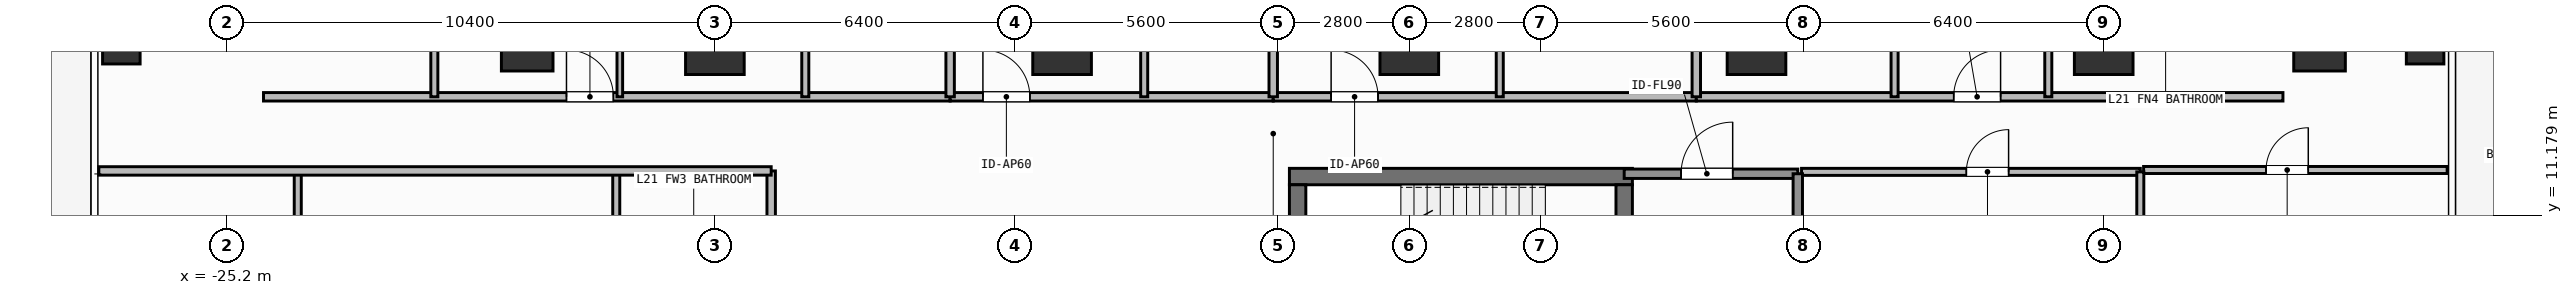
"""IFC4 building model, lengths in metres.
Left out: names, types, materials, properties, quantities, classifications, styles, units other than length and angle.
Written with IfcOpenShell. Run it as: python <this file> out.ifc"""

import sys

from ifc_helpers import new_model, si_unit, direction, frame, frame_2d, origin, origin_2d, place, context, subcontext, project, spatial, rectangle, hollow_rectangle, extrude, element, fill, save


model = new_model("IFC4")
c1 = context("Model", 3, precision=1e-05, world=origin(), true_north=direction((0.0, 1.0)))
c2 = subcontext(c1, "Body", "Model", "MODEL_VIEW")
j1 = project(units=[si_unit("LENGTHUNIT", "METRE"), si_unit("PLANEANGLEUNIT", "RADIAN")], contexts=[c1])
p1 = place(None, origin())
s1 = spatial("IfcSite", under=j1, at=p1, CompositionType="ELEMENT")
p2 = place(p1, origin())
s2 = spatial("IfcBuilding", under=s1, at=p2, CompositionType="ELEMENT")
p3 = place(p2, frame((0.0, 0.0, 85.2)))
s3 = spatial("IfcBuildingStorey", under=s2, at=p3, CompositionType="ELEMENT", Elevation=85.2)
p4 = place(p3, frame((-2.555, 12.0, 0.0), z_axis=(0.0, 0.0, 1.0), x_axis=(1.0, 0.0, 0.0)))
e1 = element("IfcWall", 1, at=p4, inside=s3, PredefinedType="SHEAR", context=c2, shape_type="SweptSolid", body=[
    extrude(rectangle(XDim=7.31, YDim=0.35, at=frame_2d((3.655, 0.0))), origin(), (0.0, 0.0, 1.0), 3.9),
])
p5 = place(p3, frame((-2.38, 8.9, 0.0), z_axis=(0.0, 0.0, 1.0), x_axis=(0.0, 1.0, 0.0)))
e2 = element("IfcWall", 2, at=p5, inside=s3, PredefinedType="SHEAR", context=c2, shape_type="SweptSolid", body=[
    extrude(rectangle(XDim=2.925, YDim=0.35, at=frame_2d((1.462, 0.0))), origin(), (0.0, 0.0, 1.0), 3.9),
])
p6 = place(p3, frame((4.58, 11.825, 0.0), z_axis=(0.0, 0.0, 1.0), x_axis=(0.0, -1.0, 0.0)))
e3 = element("IfcWall", 3, at=p6, inside=s3, PredefinedType="SHEAR", context=c2, shape_type="SweptSolid", body=[
    extrude(rectangle(XDim=2.925, YDim=0.35, at=frame_2d((1.462, 0.0))), origin(), (0.0, 0.0, 1.0), 3.9),
])
p7 = place(p6, frame((0.913, 0.0, 0.0)))
e4 = element("IfcOpeningElement", 4, at=p7, cuts=e3, PredefinedType="OPENING", context=c2, shape_type="SweptSolid", body=[
    extrude(rectangle(XDim=1.1, YDim=2.15, at=frame_2d((0.55, 1.075))), frame((0.0, 0.185, 0.0), z_axis=(0.0, -1.0, 0.0), x_axis=(1.0, 0.0, 0.0)), (0.0, 0.0, 1.0), 0.37),
])
for number, where, z_axis, x_axis in (
    (5, (-14.8, 14.8, 0.0), (0.0, 0.0, 1.0), (1.0, 0.0, 0.0)),
    (6, (-7.4, 14.8, 0.0), (0.0, 0.0, 1.0), (1.0, 0.0, 0.0)),
    (7, (0.0, 14.8, 0.0), (0.0, 0.0, 1.0), (1.0, 0.0, 0.0)),
    (8, (7.4, 14.8, 0.0), (0.0, 0.0, 1.0), (1.0, 0.0, 0.0)),
    (9, (14.8, 14.8, 0.0), (0.0, 0.0, 1.0), (1.0, 0.0, 0.0)),
):
    element("IfcColumn", number, at=place(p3, frame(where, z_axis=z_axis, x_axis=x_axis)), inside=s3, PredefinedType="COLUMN", context=c2, shape_type="SweptSolid", body=[
        extrude(rectangle(XDim=1.25, YDim=1.25, at=origin_2d()), origin(), (0.0, 0.0, 1.0), 3.9),
    ])
for number, where, z_axis, x_axis in (
    (10, (-18.8, 14.8, 0.0), (0.0, 0.0, 1.0), (1.0, 0.0, 0.0)),
    (11, (19.4, 14.8, 0.0), (0.0, 0.0, 1.0), (1.0, 0.0, 0.0)),
):
    element("IfcColumn", number, at=place(p3, frame(where, z_axis=z_axis, x_axis=x_axis)), inside=s3, PredefinedType="COLUMN", context=c2, shape_type="SweptSolid", body=[
        extrude(rectangle(XDim=1.1, YDim=1.1, at=origin_2d()), origin(), (0.0, 0.0, 1.0), 3.9),
    ])
for number, where, z_axis, x_axis in (
    (12, (-27.45, 14.8, 0.0), (0.0, 0.0, 1.0), (1.0, 0.0, 0.0)),
    (13, (21.65, 14.8, 0.0), (0.0, 0.0, 1.0), (1.0, 0.0, 0.0)),
):
    element("IfcColumn", number, at=place(p3, frame(where, z_axis=z_axis, x_axis=x_axis)), inside=s3, PredefinedType="COLUMN", context=c2, shape_type="SweptSolid", body=[
        extrude(hollow_rectangle(XDim=0.8, YDim=0.8, WallThickness=0.036, at=origin_2d()), origin(), (0.0, 0.0, 1.0), 3.9),
    ])
p8 = place(p3, frame((4.58, 12.06, 0.0), z_axis=(0.0, 0.0, 1.0), x_axis=(1.0, 0.0, 0.0)))
e14 = element("IfcWall", 14, at=p8, inside=s3, PredefinedType="SOLIDWALL", context=c2, shape_type="SweptSolid", body=[
    extrude(rectangle(XDim=3.7, YDim=0.2, at=frame_2d((1.85, 0.0))), origin(), (0.0, 0.0, 1.0), 3.68),
])
p9 = place(p8, frame((1.212, 0.0, 0.0)))
e15 = element("IfcOpeningElement", 15, at=p9, cuts=e14, PredefinedType="OPENING", context=c2, shape_type="SweptSolid", body=[
    extrude(rectangle(XDim=1.1, YDim=2.15, at=frame_2d((0.55, 1.075))), frame((0.0, 0.11, 0.0), z_axis=(0.0, -1.0, 0.0), x_axis=(1.0, 0.0, 0.0)), (0.0, 0.0, 1.0), 0.22),
])
p10 = place(p3, frame((8.36, 12.1, 0.0), z_axis=(0.0, 0.0, 1.0), x_axis=(1.0, 0.0, 0.0)))
e16 = element("IfcWall", 16, at=p10, inside=s3, PredefinedType="PARTITIONING", context=c2, shape_type="SweptSolid", body=[
    extrude(rectangle(XDim=7.22, YDim=0.15, at=frame_2d((3.61, 0.0))), origin(), (0.0, 0.0, 1.0), 3.68),
])
p11 = place(p10, frame((3.513, 0.0, 0.0)))
e17 = element("IfcOpeningElement", 17, at=p11, cuts=e16, PredefinedType="OPENING", context=c2, shape_type="SweptSolid", body=[
    extrude(rectangle(XDim=0.9, YDim=2.1, at=frame_2d((0.45, 1.05))), frame((0.0, 0.085, 0.0), z_axis=(0.0, -1.0, 0.0), x_axis=(1.0, 0.0, 0.0)), (0.0, 0.0, 1.0), 0.17),
])
p12 = place(p3, frame((-24.42, 13.7, 0.0), z_axis=(0.0, 0.0, 1.0), x_axis=(1.0, 0.0, 0.0)))
e18 = element("IfcWall", 18, at=p12, inside=s3, PredefinedType="PARTITIONING", context=c2, shape_type="SweptSolid", body=[
    extrude(rectangle(XDim=14.634, YDim=0.18, at=frame_2d((7.317, 0.0))), origin(), (0.0, 0.0, 1.0), 3.68),
])
p13 = place(p12, frame((6.457, 0.0, 0.0)))
e19 = element("IfcOpeningElement", 19, at=p13, cuts=e18, PredefinedType="OPENING", context=c2, shape_type="SweptSolid", body=[
    extrude(rectangle(XDim=1.0, YDim=2.2, at=frame_2d((0.5, 1.1))), frame((0.0, 0.1, 0.0), z_axis=(0.0, -1.0, 0.0), x_axis=(1.0, 0.0, 0.0)), (0.0, 0.0, 1.0), 0.2),
])
p14 = place(p3, frame((-16.826, 13.7, 0.0), z_axis=(0.0, 0.0, 1.0), x_axis=(0.0, 1.0, 0.0)))
e20 = element("IfcWall", 20, at=p14, inside=s3, PredefinedType="PARTITIONING", context=c2, shape_type="SweptSolid", body=[
    extrude(rectangle(XDim=12.89, YDim=0.12, at=frame_2d((6.445, 0.0))), origin(), (0.0, 0.0, 1.0), 3.68),
])
p15 = place(p14, frame((5.905, 0.0, 0.0)))
e21 = element("IfcOpeningElement", 21, at=p15, cuts=e20, PredefinedType="OPENING", context=c2, shape_type="SweptSolid", body=[
    extrude(rectangle(XDim=0.9, YDim=2.1, at=frame_2d((0.45, 1.05))), frame((0.0, 0.07, 0.0), z_axis=(0.0, -1.0, 0.0), x_axis=(1.0, 0.0, 0.0)), (0.0, 0.0, 1.0), 0.14),
])
p16 = place(p3, frame((-20.779, 13.7, 0.0), z_axis=(0.0, 0.0, 1.0), x_axis=(0.0, 1.0, 0.0)))
e22 = element("IfcWall", 22, at=p16, inside=s3, PredefinedType="PARTITIONING", context=c2, shape_type="SweptSolid", body=[
    extrude(rectangle(XDim=7.476, YDim=0.15, at=frame_2d((3.738, 0.0))), origin(), (0.0, 0.0, 1.0), 3.68),
])
p17 = place(p16, frame((3.313, 0.0, 0.0)))
e23 = element("IfcOpeningElement", 23, at=p17, cuts=e22, PredefinedType="OPENING", context=c2, shape_type="SweptSolid", body=[
    extrude(rectangle(XDim=0.85, YDim=2.1, at=frame_2d((0.425, 1.05))), frame((0.0, 0.085, 0.0), z_axis=(0.0, -1.0, 0.0), x_axis=(1.0, 0.0, 0.0)), (0.0, 0.0, 1.0), 0.17),
])
p18 = place(p3, frame((-12.873, 13.7, 0.0), z_axis=(0.0, 0.0, 1.0), x_axis=(0.0, 1.0, 0.0)))
e24 = element("IfcWall", 24, at=p18, inside=s3, PredefinedType="PARTITIONING", context=c2, shape_type="SweptSolid", body=[
    extrude(rectangle(XDim=9.023, YDim=0.15, at=frame_2d((4.511, 0.0))), origin(), (0.0, 0.0, 1.0), 3.68),
])
p19 = place(p18, frame((4.086, 0.0, 0.0)))
e25 = element("IfcOpeningElement", 25, at=p19, cuts=e24, PredefinedType="OPENING", context=c2, shape_type="SweptSolid", body=[
    extrude(rectangle(XDim=0.85, YDim=2.1, at=frame_2d((0.425, 1.05))), frame((0.0, 0.085, 0.0), z_axis=(0.0, -1.0, 0.0), x_axis=(1.0, 0.0, 0.0)), (0.0, 0.0, 1.0), 0.17),
])
p20 = place(p3, frame((-9.786, 13.7, 0.0), z_axis=(0.0, 0.0, 1.0), x_axis=(1.0, 0.0, 0.0)))
e26 = element("IfcWall", 26, at=p20, inside=s3, PredefinedType="PARTITIONING", context=c2, shape_type="SweptSolid", body=[
    extrude(rectangle(XDim=6.886, YDim=0.18, at=frame_2d((3.443, 0.0))), origin(), (0.0, 0.0, 1.0), 3.68),
])
p21 = place(p20, frame((0.698, 0.0, 0.0)))
e27 = element("IfcOpeningElement", 27, at=p21, cuts=e26, PredefinedType="OPENING", context=c2, shape_type="SweptSolid", body=[
    extrude(rectangle(XDim=1.0, YDim=2.2, at=frame_2d((0.5, 1.1))), frame((0.0, 0.1, 0.0), z_axis=(0.0, -1.0, 0.0), x_axis=(1.0, 0.0, 0.0)), (0.0, 0.0, 1.0), 0.2),
])
p22 = place(p3, frame((-5.65, 13.7, 0.0), z_axis=(0.0, 0.0, 1.0), x_axis=(0.0, 1.0, 0.0)))
e28 = element("IfcWall", 28, at=p22, inside=s3, PredefinedType="PARTITIONING", context=c2, shape_type="SweptSolid", body=[
    extrude(rectangle(XDim=7.09, YDim=0.15, at=frame_2d((3.545, 0.0))), origin(), (0.0, 0.0, 1.0), 3.68),
])
p23 = place(p22, frame((3.03, 0.0, 0.0)))
e29 = element("IfcOpeningElement", 29, at=p23, cuts=e28, PredefinedType="OPENING", context=c2, shape_type="SweptSolid", body=[
    extrude(rectangle(XDim=0.85, YDim=2.1, at=frame_2d((0.425, 1.05))), frame((0.0, 0.085, 0.0), z_axis=(0.0, -1.0, 0.0), x_axis=(1.0, 0.0, 0.0)), (0.0, 0.0, 1.0), 0.17),
])
p24 = place(p3, frame((-2.9, 13.7, 0.0), z_axis=(0.0, 0.0, 1.0), x_axis=(1.0, 0.0, 0.0)))
e30 = element("IfcWall", 30, at=p24, inside=s3, PredefinedType="PARTITIONING", context=c2, shape_type="SweptSolid", body=[
    extrude(rectangle(XDim=9.017, YDim=0.18, at=frame_2d((4.508, 0.0))), origin(), (0.0, 0.0, 1.0), 3.68),
])
p25 = place(p24, frame((1.234, 0.0, 0.0)))
e31 = element("IfcOpeningElement", 31, at=p25, cuts=e30, PredefinedType="OPENING", context=c2, shape_type="SweptSolid", body=[
    extrude(rectangle(XDim=1.0, YDim=2.2, at=frame_2d((0.5, 1.1))), frame((0.0, 0.1, 0.0), z_axis=(0.0, -1.0, 0.0), x_axis=(1.0, 0.0, 0.0)), (0.0, 0.0, 1.0), 0.2),
])
p26 = place(p3, frame((1.928, 13.7, 0.0), z_axis=(0.0, 0.0, 1.0), x_axis=(0.0, 1.0, 0.0)))
e32 = element("IfcWall", 32, at=p26, inside=s3, PredefinedType="PARTITIONING", context=c2, shape_type="SweptSolid", body=[
    extrude(rectangle(XDim=8.474, YDim=0.15, at=frame_2d((4.237, 0.0))), origin(), (0.0, 0.0, 1.0), 3.68),
])
p27 = place(p26, frame((3.723, 0.0, 0.0)))
e33 = element("IfcOpeningElement", 33, at=p27, cuts=e32, PredefinedType="OPENING", context=c2, shape_type="SweptSolid", body=[
    extrude(rectangle(XDim=0.85, YDim=2.1, at=frame_2d((0.425, 1.05))), frame((0.0, 0.085, 0.0), z_axis=(0.0, -1.0, 0.0), x_axis=(1.0, 0.0, 0.0)), (0.0, 0.0, 1.0), 0.17),
])
p28 = place(p3, frame((6.117, 13.7, 0.0), z_axis=(0.0, 0.0, 1.0), x_axis=(1.0, 0.0, 0.0)))
e34 = element("IfcWall", 34, at=p28, inside=s3, PredefinedType="PARTITIONING", context=c2, shape_type="SweptSolid", body=[
    extrude(rectangle(XDim=12.503, YDim=0.18, at=frame_2d((6.251, 0.0))), origin(), (0.0, 0.0, 1.0), 3.68),
])
p29 = place(p28, frame((5.485, 0.0, 0.0)))
e35 = element("IfcOpeningElement", 35, at=p29, cuts=e34, PredefinedType="OPENING", context=c2, shape_type="SweptSolid", body=[
    extrude(rectangle(XDim=1.0, YDim=2.2, at=frame_2d((0.5, 1.1))), frame((0.0, 0.1, 0.0), z_axis=(0.0, -1.0, 0.0), x_axis=(1.0, 0.0, 0.0)), (0.0, 0.0, 1.0), 0.2),
])
p30 = place(p3, frame((10.343, 13.7, 0.0), z_axis=(0.0, 0.0, 1.0), x_axis=(0.0, 1.0, 0.0)))
e36 = element("IfcWall", 36, at=p30, inside=s3, PredefinedType="PARTITIONING", context=c2, shape_type="SweptSolid", body=[
    extrude(rectangle(XDim=8.045, YDim=0.15, at=frame_2d((4.022, 0.0))), origin(), (0.0, 0.0, 1.0), 3.68),
])
p31 = place(p30, frame((3.51, 0.0, 0.0)))
e37 = element("IfcOpeningElement", 37, at=p31, cuts=e36, PredefinedType="OPENING", context=c2, shape_type="SweptSolid", body=[
    extrude(rectangle(XDim=0.85, YDim=2.1, at=frame_2d((0.425, 1.05))), frame((0.0, 0.085, 0.0), z_axis=(0.0, -1.0, 0.0), x_axis=(1.0, 0.0, 0.0)), (0.0, 0.0, 1.0), 0.17),
])
p32 = place(p3, frame((13.619, 13.7, 0.0), z_axis=(0.0, 0.0, 1.0), x_axis=(0.0, 1.0, 0.0)))
e38 = element("IfcWall", 38, at=p32, inside=s3, PredefinedType="PARTITIONING", context=c2, shape_type="SweptSolid", body=[
    extrude(rectangle(XDim=3.48, YDim=0.15, at=frame_2d((1.74, 0.0))), origin(), (0.0, 0.0, 1.0), 3.68),
])
p33 = place(p32, frame((1.937, 0.0, 0.0)))
e39 = element("IfcOpeningElement", 39, at=p33, cuts=e38, PredefinedType="OPENING", context=c2, shape_type="SweptSolid", body=[
    extrude(rectangle(XDim=0.85, YDim=2.1, at=frame_2d((0.425, 1.05))), frame((0.0, 0.085, 0.0), z_axis=(0.0, -1.0, 0.0), x_axis=(1.0, 0.0, 0.0)), (0.0, 0.0, 1.0), 0.17),
])
p34 = place(p3, frame((-13.6, 4.04, 0.0), z_axis=(0.0, 0.0, 1.0), x_axis=(0.0, 1.0, 0.0)))
e40 = element("IfcWall", 40, at=p34, inside=s3, PredefinedType="PARTITIONING", context=c2, shape_type="SweptSolid", body=[
    extrude(rectangle(XDim=8.08, YDim=0.18, at=frame_2d((4.04, 0.0))), origin(), (0.0, 0.0, 1.0), 3.68),
])
p35 = place(p34, frame((1.583, 0.0, 0.0)))
e41 = element("IfcOpeningElement", 41, at=p35, cuts=e40, PredefinedType="OPENING", context=c2, shape_type="SweptSolid", body=[
    extrude(rectangle(XDim=1.0, YDim=2.2, at=frame_2d((0.5, 1.1))), frame((0.0, 0.1, 0.0), z_axis=(0.0, -1.0, 0.0), x_axis=(1.0, 0.0, 0.0)), (0.0, 0.0, 1.0), 0.2),
])
p36 = place(p3, frame((15.65, 12.14, 0.0), z_axis=(0.0, 0.0, 1.0), x_axis=(1.0, 0.0, 0.0)))
e42 = element("IfcWall", 42, at=p36, inside=s3, PredefinedType="PARTITIONING", context=c2, shape_type="SweptSolid", body=[
    extrude(rectangle(XDim=6.47, YDim=0.15, at=frame_2d((3.235, 0.0))), origin(), (0.0, 0.0, 1.0), 3.68),
])
p37 = place(p36, frame((2.61, 0.0, 0.0)))
e43 = element("IfcOpeningElement", 43, at=p37, cuts=e42, PredefinedType="OPENING", context=c2, shape_type="SweptSolid", body=[
    extrude(rectangle(XDim=0.9, YDim=2.1, at=frame_2d((0.45, 1.05))), frame((0.0, 0.085, 0.0), z_axis=(0.0, -1.0, 0.0), x_axis=(1.0, 0.0, 0.0)), (0.0, 0.0, 1.0), 0.17),
])
p38 = place(p3, frame((8.28, 8.875, 0.0), z_axis=(0.0, 0.0, 1.0), x_axis=(0.0, 1.0, 0.0)))
e44 = element("IfcWall", 44, at=p38, inside=s3, PredefinedType="SOLIDWALL", context=c2, shape_type="SweptSolid", body=[
    extrude(rectangle(XDim=3.185, YDim=0.2, at=frame_2d((1.593, 0.0))), origin(), (0.0, 0.0, 1.0), 3.68),
])
p39 = place(p3, frame((15.58, 5.85, 0.0), z_axis=(0.0, 0.0, 1.0), x_axis=(0.0, 1.0, 0.0)))
e45 = element("IfcWall", 45, at=p39, inside=s3, PredefinedType="PARTITIONING", context=c2, shape_type="SweptSolid", body=[
    extrude(rectangle(XDim=6.25, YDim=0.15, at=frame_2d((3.125, 0.0))), origin(), (0.0, 0.0, 1.0), 3.68),
])
for number, where, z_axis, x_axis in (
    (46, (-9.786, 13.7, 0.0), (0.0, 0.0, 1.0), (0.0, 1.0, 0.0)),
    (47, (-2.9, 13.7, 0.0), (0.0, 0.0, 1.0), (0.0, 1.0, 0.0)),
    (48, (6.117, 13.7, 0.0), (0.0, 0.0, 1.0), (0.0, 1.0, 0.0)),
):
    element("IfcWall", number, at=place(p3, frame(where, z_axis=z_axis, x_axis=x_axis)), inside=s3, PredefinedType="PARTITIONING", context=c2, shape_type="SweptSolid", body=[
        extrude(rectangle(XDim=17.13, YDim=0.18, at=frame_2d((8.565, 0.0))), origin(), (0.0, 0.0, 1.0), 3.68),
    ])
for number, where, z_axis, x_axis in (
    (49, (-16.902, 9.32, 0.0), (0.0, 0.0, 1.0), (0.0, 1.0, 0.0)),
    (50, (-23.69, 9.32, 0.0), (0.0, 0.0, 1.0), (0.0, 1.0, 0.0)),
):
    element("IfcWall", number, at=place(p3, frame(where, z_axis=z_axis, x_axis=x_axis)), inside=s3, PredefinedType="PARTITIONING", context=c2, shape_type="SweptSolid", body=[
        extrude(rectangle(XDim=2.8, YDim=0.15, at=frame_2d((1.4, 0.0))), origin(), (0.0, 0.0, 1.0), 3.68),
    ])
p40 = place(p3, frame((-27.93, 12.12, 0.0), z_axis=(0.0, 0.0, 1.0), x_axis=(1.0, 0.0, 0.0)))
e51 = element("IfcWall", 51, at=p40, inside=s3, PredefinedType="PARTITIONING", context=c2, shape_type="SweptSolid", body=[
    extrude(rectangle(XDim=14.33, YDim=0.18, at=frame_2d((7.165, 0.0))), origin(), (0.0, 0.0, 1.0), 3.68),
])
p41 = place(p9, origin())
e52 = element("IfcDoor", 52, at=p41, inside=s3, OperationType="SINGLE_SWING_RIGHT", PredefinedType="DOOR", context=c2, shape_type="SweptSolid", body=[
    extrude(rectangle(XDim=1.1, YDim=2.15, at=frame_2d((0.55, 1.075))), frame((0.0, 0.025, 0.0), z_axis=(0.0, -1.0, 0.0), x_axis=(1.0, 0.0, 0.0)), (0.0, 0.0, 1.0), 0.05),
])
fill(e15, e52)
p42 = place(p11, origin())
e53 = element("IfcDoor", 53, at=p42, inside=s3, OperationType="SINGLE_SWING_RIGHT", PredefinedType="DOOR", context=c2, shape_type="SweptSolid", body=[
    extrude(rectangle(XDim=0.9, YDim=2.1, at=frame_2d((0.45, 1.05))), frame((0.0, 0.025, 0.0), z_axis=(0.0, -1.0, 0.0), x_axis=(1.0, 0.0, 0.0)), (0.0, 0.0, 1.0), 0.05),
])
fill(e17, e53)
p43 = place(p13, origin())
e54 = element("IfcDoor", 54, at=p43, inside=s3, OperationType="SINGLE_SWING_LEFT", PredefinedType="DOOR", context=c2, shape_type="SweptSolid", body=[
    extrude(rectangle(XDim=1.0, YDim=2.2, at=frame_2d((0.5, 1.1))), frame((0.0, 0.025, 0.0), z_axis=(0.0, -1.0, 0.0), x_axis=(1.0, 0.0, 0.0)), (0.0, 0.0, 1.0), 0.05),
])
fill(e19, e54)
p44 = place(p21, origin())
e55 = element("IfcDoor", 55, at=p44, inside=s3, OperationType="SINGLE_SWING_LEFT", PredefinedType="DOOR", context=c2, shape_type="SweptSolid", body=[
    extrude(rectangle(XDim=1.0, YDim=2.2, at=frame_2d((0.5, 1.1))), frame((0.0, 0.025, 0.0), z_axis=(0.0, -1.0, 0.0), x_axis=(1.0, 0.0, 0.0)), (0.0, 0.0, 1.0), 0.05),
])
fill(e27, e55)
p45 = place(p25, origin())
e56 = element("IfcDoor", 56, at=p45, inside=s3, OperationType="SINGLE_SWING_LEFT", PredefinedType="DOOR", context=c2, shape_type="SweptSolid", body=[
    extrude(rectangle(XDim=1.0, YDim=2.2, at=frame_2d((0.5, 1.1))), frame((0.0, 0.025, 0.0), z_axis=(0.0, -1.0, 0.0), x_axis=(1.0, 0.0, 0.0)), (0.0, 0.0, 1.0), 0.05),
])
fill(e31, e56)
p46 = place(p29, origin())
e57 = element("IfcDoor", 57, at=p46, inside=s3, OperationType="SINGLE_SWING_RIGHT", PredefinedType="DOOR", context=c2, shape_type="SweptSolid", body=[
    extrude(rectangle(XDim=1.0, YDim=2.2, at=frame_2d((0.5, 1.1))), frame((0.0, 0.025, 0.0), z_axis=(0.0, -1.0, 0.0), x_axis=(1.0, 0.0, 0.0)), (0.0, 0.0, 1.0), 0.05),
])
fill(e35, e57)
p47 = place(p37, origin())
e58 = element("IfcDoor", 58, at=p47, inside=s3, OperationType="SINGLE_SWING_RIGHT", PredefinedType="DOOR", context=c2, shape_type="SweptSolid", body=[
    extrude(rectangle(XDim=0.9, YDim=2.1, at=frame_2d((0.45, 1.05))), frame((0.0, 0.025, 0.0), z_axis=(0.0, -1.0, 0.0), x_axis=(1.0, 0.0, 0.0)), (0.0, 0.0, 1.0), 0.05),
])
fill(e43, e58)
save(model, sys.argv[1])
